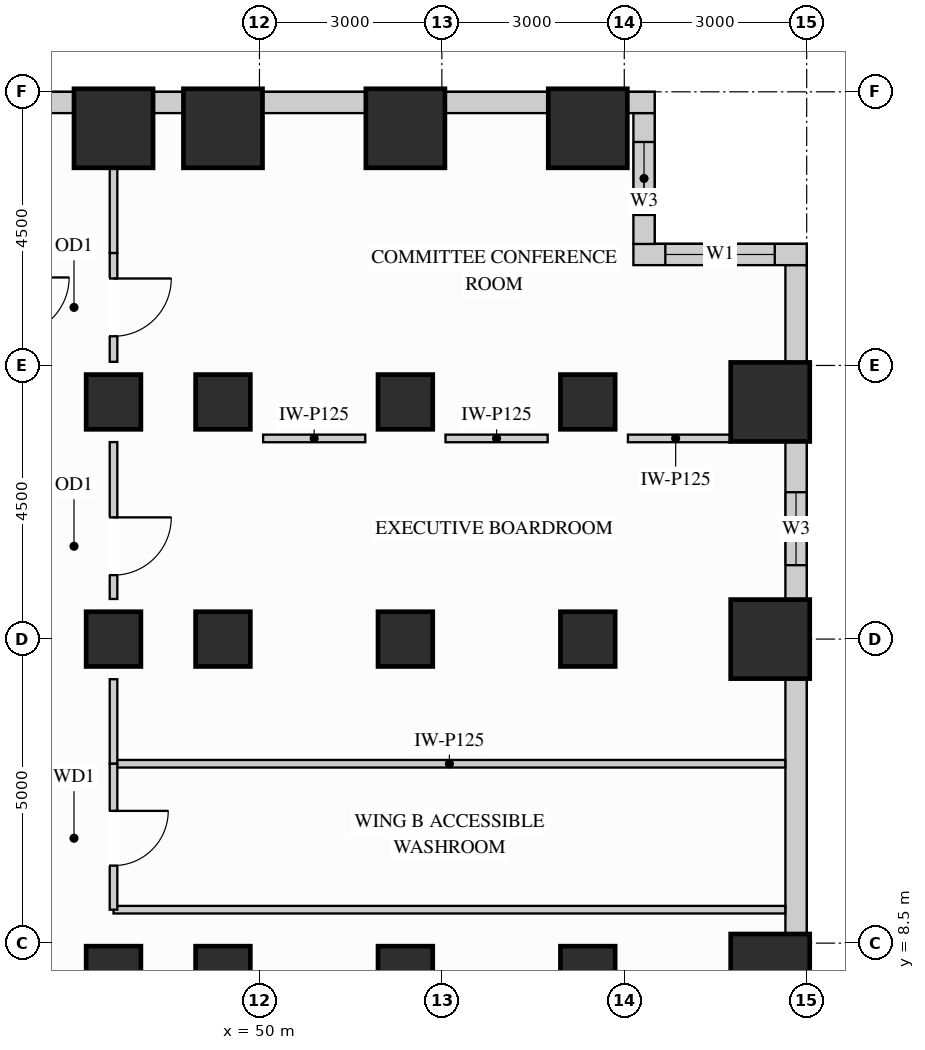
"""IFC4 building model, lengths in metres.
Left out: names, types, materials, properties, quantities, classifications, styles, units other than length and angle.
Written with IfcOpenShell. Run it as: python <this file> out.ifc"""

import sys

from ifc_helpers import new_model, si_unit, direction, frame, frame_2d, origin, origin_2d, place, context, subcontext, project, spatial, rectangle, extrude, source, transform, mapped, element, fill, save


model = new_model("IFC4")
c1 = context("Model", 3, precision=1e-05, world=origin(), true_north=direction((0.0, 1.0)))
c2 = subcontext(c1, "Body", "Model", "MODEL_VIEW")
j1 = project(units=[si_unit("LENGTHUNIT", "METRE"), si_unit("PLANEANGLEUNIT", "RADIAN")], contexts=[c1])
p1 = place(None, origin())
s1 = spatial("IfcSite", under=j1, at=p1, CompositionType="ELEMENT")
p2 = place(p1, origin())
s2 = spatial("IfcBuilding", under=s1, at=p2, CompositionType="ELEMENT")
p3 = place(p2, frame((0.0, 0.0, 51.3)))
s3 = spatial("IfcBuildingStorey", under=s2, at=p3, CompositionType="ELEMENT", Elevation=51.3)
m1 = source(origin(), c2, "Body", "SweptSolid", [
    extrude(rectangle(XDim=0.9, YDim=0.9, at=origin_2d()), origin(), (0.0, 0.0, 1.0), 3.38),
])
for number, where, z_axis, x_axis in (
    (1, (47.6, 13.5, 0.0), (0.0, 0.0, 1.0), (1.0, 0.0, 0.0)),
    (2, (47.6, 8.0, 0.0), (0.0, 0.0, 1.0), (1.0, 0.0, 0.0)),
    (3, (47.6, 17.4, 0.0), (0.0, 0.0, 1.0), (1.0, 0.0, 0.0)),
    (4, (49.4, 13.5, 0.0), (0.0, 0.0, 1.0), (1.0, 0.0, 0.0)),
    (5, (49.4, 17.4, 0.0), (0.0, 0.0, 1.0), (1.0, 0.0, 0.0)),
    (6, (49.4, 8.0, 0.0), (0.0, 0.0, 1.0), (1.0, 0.0, 0.0)),
    (7, (52.4, 13.5, 0.0), (0.0, 0.0, 1.0), (1.0, 0.0, 0.0)),
    (8, (52.4, 17.4, 0.0), (0.0, 0.0, 1.0), (1.0, 0.0, 0.0)),
    (9, (52.4, 8.0, 0.0), (0.0, 0.0, 1.0), (1.0, 0.0, 0.0)),
    (10, (55.4, 13.5, 0.0), (0.0, 0.0, 1.0), (1.0, 0.0, 0.0)),
    (11, (55.4, 17.4, 0.0), (0.0, 0.0, 1.0), (1.0, 0.0, 0.0)),
    (12, (55.4, 8.0, 0.0), (0.0, 0.0, 1.0), (1.0, 0.0, 0.0)),
):
    element("IfcColumn", number, at=place(p3, frame(where, z_axis=z_axis, x_axis=x_axis)), inside=s3, PredefinedType="COLUMN", context=c2, shape_type="MappedRepresentation", body=[
        mapped(m1, transform((0.0, 0.0, 0.0), x_axis=(1.0, 0.0, 0.0), y_axis=(0.0, 1.0, 0.0), z_axis=(0.0, 0.0, 1.0))),
    ])
m2 = source(origin(), c2, "Body", "SweptSolid", [
    extrude(rectangle(XDim=1.3, YDim=1.3, at=origin_2d()), origin(), (0.0, 0.0, 1.0), 3.38),
])
for number, where, z_axis, x_axis in (
    (13, (47.6, 21.9, 0.0), (0.0, 0.0, 1.0), (1.0, 0.0, 0.0)),
    (14, (49.4, 21.9, 0.0), (0.0, 0.0, 1.0), (1.0, 0.0, 0.0)),
    (15, (52.4, 21.9, 0.0), (0.0, 0.0, 1.0), (1.0, 0.0, 0.0)),
    (16, (55.4, 21.9, 0.0), (0.0, 0.0, 1.0), (1.0, 0.0, 0.0)),
    (17, (58.4, 13.5, 0.0), (0.0, 0.0, 1.0), (1.0, 0.0, 0.0)),
    (18, (58.4, 17.4, 0.0), (0.0, 0.0, 1.0), (1.0, 0.0, 0.0)),
    (19, (58.4, 8.0, 0.0), (0.0, 0.0, 1.0), (1.0, 0.0, 0.0)),
):
    element("IfcColumn", number, at=place(p3, frame(where, z_axis=z_axis, x_axis=x_axis)), inside=s3, PredefinedType="COLUMN", context=c2, shape_type="MappedRepresentation", body=[
        mapped(m2, transform((0.0, 0.0, 0.0), x_axis=(1.0, 0.0, 0.0), y_axis=(0.0, 1.0, 0.0), z_axis=(0.0, 0.0, 1.0))),
    ])
m3 = source(origin(), c2, "Body", "SweptSolid", [
    extrude(rectangle(XDim=4.204, YDim=0.35, at=frame_2d((2.102, 0.0))), origin(), (0.0, 0.0, 1.0), 2.51),
])
p4 = place(p3, frame((58.825, 8.648, 0.0), z_axis=(0.0, 0.0, 1.0), x_axis=(0.0, 1.0, 0.0)))
e20 = element("IfcWall", 20, at=p4, inside=s3, PredefinedType="SOLIDWALL", context=c2, shape_type="MappedRepresentation", body=[
    mapped(m3, transform((0.0, 0.0, 0.0), x_axis=(1.0, 0.0, 0.0), y_axis=(0.0, 1.0, 0.0), z_axis=(0.0, 0.0, 1.0))),
])
p5 = place(p3, frame((58.825, 14.148, 0.0), z_axis=(0.0, 0.0, 1.0), x_axis=(0.0, 1.0, 0.0)))
e21 = element("IfcWall", 21, at=p5, inside=s3, PredefinedType="SOLIDWALL", context=c2, shape_type="SweptSolid", body=[
    extrude(rectangle(XDim=2.604, YDim=0.35, at=frame_2d((1.302, 0.0))), origin(), (0.0, 0.0, 1.0), 2.51),
])
p6 = place(p5, frame((0.567, 0.0, 0.78)))
e22 = element("IfcOpeningElement", 22, at=p6, cuts=e21, PredefinedType="OPENING", context=c2, shape_type="SweptSolid", body=[
    extrude(rectangle(XDim=1.2, YDim=1.55, at=frame_2d((0.6, 0.775))), frame((0.0, 0.185, 0.0), z_axis=(0.0, -1.0, 0.0), x_axis=(1.0, 0.0, 0.0)), (0.0, 0.0, 1.0), 0.37),
])
m4 = source(origin(), c2, "Body", "SweptSolid", [
    extrude(rectangle(XDim=1.604, YDim=0.35, at=frame_2d((0.802, 0.0))), origin(), (0.0, 0.0, 1.0), 3.365),
])
p7 = place(p3, frame((58.825, 18.048, 0.0), z_axis=(0.0, 0.0, 1.0), x_axis=(0.0, 1.0, 0.0)))
e23 = element("IfcWall", 23, at=p7, inside=s3, PredefinedType="SOLIDWALL", context=c2, shape_type="MappedRepresentation", body=[
    mapped(m4, transform((0.0, 0.0, 0.0), x_axis=(1.0, 0.0, 0.0), y_axis=(0.0, 1.0, 0.0), z_axis=(0.0, 0.0, 1.0))),
])
p8 = place(p3, frame((59.0, 19.825, 0.0), z_axis=(0.0, 0.0, 1.0), x_axis=(-1.0, 0.0, 0.0)))
e24 = element("IfcWall", 24, at=p8, inside=s3, PredefinedType="SOLIDWALL", context=c2, shape_type="SweptSolid", body=[
    extrude(rectangle(XDim=2.85, YDim=0.35, at=frame_2d((1.425, 0.0))), origin(), (0.0, 0.0, 1.0), 3.365),
])
p9 = place(p8, frame((0.525, 0.0, 0.78)))
e25 = element("IfcOpeningElement", 25, at=p9, cuts=e24, PredefinedType="OPENING", context=c2, shape_type="SweptSolid", body=[
    extrude(rectangle(XDim=1.8, YDim=2.1, at=frame_2d((0.9, 1.05))), frame((0.0, 0.185, 0.0), z_axis=(0.0, -1.0, 0.0), x_axis=(1.0, 0.0, 0.0)), (0.0, 0.0, 1.0), 0.37),
])
p10 = place(p3, frame((56.325, 19.998, 0.0), z_axis=(0.0, 0.0, 1.0), x_axis=(0.0, 1.0, 0.0)))
e26 = element("IfcWall", 26, at=p10, inside=s3, PredefinedType="SOLIDWALL", context=c2, shape_type="SweptSolid", body=[
    extrude(rectangle(XDim=2.154, YDim=0.35, at=frame_2d((1.077, 0.0))), origin(), (0.0, 0.0, 1.0), 3.365),
])
p11 = place(p10, frame((0.477, 0.0, 0.78)))
e27 = element("IfcOpeningElement", 27, at=p11, cuts=e26, PredefinedType="OPENING", context=c2, shape_type="SweptSolid", body=[
    extrude(rectangle(XDim=1.2, YDim=2.1, at=frame_2d((0.6, 1.05))), frame((0.0, 0.185, 0.0), z_axis=(0.0, -1.0, 0.0), x_axis=(1.0, 0.0, 0.0)), (0.0, 0.0, 1.0), 0.37),
])
m5 = source(origin(), c2, "Body", "SweptSolid", [
    extrude(rectangle(XDim=0.452, YDim=0.35, at=frame_2d((0.226, 0.0))), origin(), (0.0, 0.0, 1.0), 3.365),
])
p12 = place(p3, frame((56.5, 22.325, 0.0), z_axis=(0.0, 0.0, 1.0), x_axis=(-1.0, 0.0, 0.0)))
e28 = element("IfcWall", 28, at=p12, inside=s3, PredefinedType="SOLIDWALL", context=c2, shape_type="MappedRepresentation", body=[
    mapped(m5, transform((0.0, 0.0, 0.0), x_axis=(1.0, 0.0, 0.0), y_axis=(0.0, 1.0, 0.0), z_axis=(0.0, 0.0, 1.0))),
])
m6 = source(origin(), c2, "Body", "SweptSolid", [
    extrude(rectangle(XDim=1.704, YDim=0.35, at=frame_2d((0.852, 0.0))), origin(), (0.0, 0.0, 1.0), 2.51),
])
for number, where, z_axis, x_axis in (
    (29, (54.752, 22.325, 0.0), (0.0, 0.0, 1.0), (-1.0, 0.0, 0.0)),
    (30, (51.752, 22.325, 0.0), (0.0, 0.0, 1.0), (-1.0, 0.0, 0.0)),
):
    element("IfcWall", number, at=place(p3, frame(where, z_axis=z_axis, x_axis=x_axis)), inside=s3, PredefinedType="SOLIDWALL", context=c2, shape_type="MappedRepresentation", body=[
        mapped(m6, transform((0.0, 0.0, 0.0), x_axis=(1.0, 0.0, 0.0), y_axis=(0.0, 1.0, 0.0), z_axis=(0.0, 0.0, 1.0))),
    ])
m7 = source(origin(), c2, "Body", "SweptSolid", [
    extrude(rectangle(XDim=0.504, YDim=0.35, at=frame_2d((0.252, 0.0))), origin(), (0.0, 0.0, 1.0), 3.365),
])
p13 = place(p3, frame((48.752, 22.325, 0.0), z_axis=(0.0, 0.0, 1.0), x_axis=(-1.0, 0.0, 0.0)))
e31 = element("IfcWall", 31, at=p13, inside=s3, PredefinedType="SOLIDWALL", context=c2, shape_type="MappedRepresentation", body=[
    mapped(m7, transform((0.0, 0.0, 0.0), x_axis=(1.0, 0.0, 0.0), y_axis=(0.0, 1.0, 0.0), z_axis=(0.0, 0.0, 1.0))),
])
p14 = place(p3, frame((46.952, 22.325, 0.0), z_axis=(0.0, 0.0, 1.0), x_axis=(-1.0, 0.0, 0.0)))
e32 = element("IfcWall", 32, at=p14, inside=s3, PredefinedType="SOLIDWALL", context=c2, shape_type="SweptSolid", body=[
    extrude(rectangle(XDim=6.304, YDim=0.35, at=frame_2d((3.152, 0.0))), origin(), (0.0, 0.0, 1.0), 2.51),
])
p15 = place(p14, frame((1.649, 0.0, 0.78)))
e33 = element("IfcOpeningElement", 33, at=p15, cuts=e32, PredefinedType="OPENING", context=c2, shape_type="SweptSolid", body=[
    extrude(rectangle(XDim=1.8, YDim=1.55, at=frame_2d((0.9, 0.775))), frame((0.0, 0.185, 0.0), z_axis=(0.0, -1.0, 0.0), x_axis=(1.0, 0.0, 0.0)), (0.0, 0.0, 1.0), 0.37),
])
p16 = place(p14, frame((3.817, 0.0, 0.78)))
e34 = element("IfcOpeningElement", 34, at=p16, cuts=e32, PredefinedType="OPENING", context=c2, shape_type="SweptSolid", body=[
    extrude(rectangle(XDim=1.8, YDim=1.55, at=frame_2d((0.9, 0.775))), frame((0.0, 0.185, 0.0), z_axis=(0.0, -1.0, 0.0), x_axis=(1.0, 0.0, 0.0)), (0.0, 0.0, 1.0), 0.37),
])
m8 = source(origin(), c2, "Body", "SweptSolid", [
    extrude(rectangle(XDim=11.048, YDim=0.125, at=frame_2d((5.524, 0.0))), origin(), (0.0, 0.0, 1.0), 3.365),
])
p17 = place(p3, frame((47.6, 11.45, 0.0), z_axis=(0.0, 0.0, 1.0), x_axis=(1.0, 0.0, 0.0)))
e35 = element("IfcWall", 35, at=p17, inside=s3, PredefinedType="PARTITIONING", context=c2, shape_type="MappedRepresentation", body=[
    mapped(m8, transform((0.0, 0.0, 0.0), x_axis=(1.0, 0.0, 0.0), y_axis=(0.0, 1.0, 0.0), z_axis=(0.0, 0.0, 1.0))),
])
m9 = source(origin(), c2, "Body", "SweptSolid", [
    extrude(rectangle(XDim=1.68, YDim=0.125, at=frame_2d((0.84, 0.0))), origin(), (0.0, 0.0, 1.0), 2.67),
])
for number, where, z_axis, x_axis in (
    (36, (50.06, 16.8, 0.0), (0.0, 0.0, 1.0), (1.0, 0.0, 0.0)),
    (37, (53.06, 16.8, 0.0), (0.0, 0.0, 1.0), (1.0, 0.0, 0.0)),
    (38, (56.06, 16.8, 0.0), (0.0, 0.0, 1.0), (1.0, 0.0, 0.0)),
):
    element("IfcWall", number, at=place(p3, frame(where, z_axis=z_axis, x_axis=x_axis)), inside=s3, PredefinedType="PARTITIONING", context=c2, shape_type="MappedRepresentation", body=[
        mapped(m9, transform((0.0, 0.0, 0.0), x_axis=(1.0, 0.0, 0.0), y_axis=(0.0, 1.0, 0.0), z_axis=(0.0, 0.0, 1.0))),
    ])
p18 = place(p3, frame((47.6, 9.05, 0.0), z_axis=(0.0, 0.0, 1.0), x_axis=(1.0, 0.0, 0.0)))
e39 = element("IfcWall", 39, at=p18, inside=s3, PredefinedType="PARTITIONING", context=c2, shape_type="MappedRepresentation", body=[
    mapped(m8, transform((0.0, 0.0, 0.0), x_axis=(1.0, 0.0, 0.0), y_axis=(0.0, 1.0, 0.0), z_axis=(0.0, 0.0, 1.0))),
])
m10 = source(origin(), c2, "Body", "SweptSolid", [
    extrude(rectangle(XDim=1.39, YDim=0.125, at=frame_2d((0.695, 0.0))), origin(), (0.0, 0.0, 1.0), 2.67),
])
p19 = place(p3, frame((47.6, 11.45, 0.0), z_axis=(0.0, 0.0, 1.0), x_axis=(0.0, 1.0, 0.0)))
e40 = element("IfcWall", 40, at=p19, inside=s3, PredefinedType="PARTITIONING", context=c2, shape_type="MappedRepresentation", body=[
    mapped(m10, transform((0.0, 0.0, 0.0), x_axis=(1.0, 0.0, 0.0), y_axis=(0.0, 1.0, 0.0), z_axis=(0.0, 0.0, 1.0))),
])
p20 = place(p3, frame((47.6, 14.16, 0.0), z_axis=(0.0, 0.0, 1.0), x_axis=(0.0, 1.0, 0.0)))
e41 = element("IfcWall", 41, at=p20, inside=s3, PredefinedType="PARTITIONING", context=c2, shape_type="SweptSolid", body=[
    extrude(rectangle(XDim=2.58, YDim=0.125, at=frame_2d((1.29, 0.0))), origin(), (0.0, 0.0, 1.0), 2.67),
])
p21 = place(p20, frame((0.392, 0.0, 0.0)))
e42 = element("IfcOpeningElement", 42, at=p21, cuts=e41, PredefinedType="OPENING", context=c2, shape_type="SweptSolid", body=[
    extrude(rectangle(XDim=0.95, YDim=2.15, at=frame_2d((0.475, 1.075))), frame((0.0, 0.073, 0.0), z_axis=(0.0, -1.0, 0.0), x_axis=(1.0, 0.0, 0.0)), (0.0, 0.0, 1.0), 0.145),
])
p22 = place(p3, frame((47.6, 18.06, 0.0), z_axis=(0.0, 0.0, 1.0), x_axis=(0.0, 1.0, 0.0)))
e43 = element("IfcWall", 43, at=p22, inside=s3, PredefinedType="PARTITIONING", context=c2, shape_type="SweptSolid", body=[
    extrude(rectangle(XDim=1.79, YDim=0.125, at=frame_2d((0.895, 0.0))), origin(), (0.0, 0.0, 1.0), 2.67),
])
p23 = place(p22, frame((0.42, 0.0, 0.0)))
e44 = element("IfcOpeningElement", 44, at=p23, cuts=e43, PredefinedType="OPENING", context=c2, shape_type="SweptSolid", body=[
    extrude(rectangle(XDim=0.95, YDim=2.15, at=frame_2d((0.475, 1.075))), frame((0.0, 0.073, 0.0), z_axis=(0.0, -1.0, 0.0), x_axis=(1.0, 0.0, 0.0)), (0.0, 0.0, 1.0), 0.145),
])
m11 = source(origin(), c2, "Body", "SweptSolid", [
    extrude(rectangle(XDim=1.39, YDim=0.125, at=frame_2d((0.695, 0.0))), origin(), (0.0, 0.0, 1.0), 2.67),
])
p24 = place(p3, frame((47.6, 19.85, 0.0), z_axis=(0.0, 0.0, 1.0), x_axis=(0.0, 1.0, 0.0)))
e45 = element("IfcWall", 45, at=p24, inside=s3, PredefinedType="PARTITIONING", context=c2, shape_type="MappedRepresentation", body=[
    mapped(m11, transform((0.0, 0.0, 0.0), x_axis=(1.0, 0.0, 0.0), y_axis=(0.0, 1.0, 0.0), z_axis=(0.0, 0.0, 1.0))),
])
p25 = place(p3, frame((47.6, 9.05, 0.0), z_axis=(0.0, 0.0, 1.0), x_axis=(0.0, 1.0, 0.0)))
e46 = element("IfcWall", 46, at=p25, inside=s3, PredefinedType="PARTITIONING", context=c2, shape_type="SweptSolid", body=[
    extrude(rectangle(XDim=2.4, YDim=0.125, at=frame_2d((1.2, 0.0))), origin(), (0.0, 0.0, 1.0), 2.67),
])
p26 = place(p25, frame((0.725, 0.0, 0.0)))
e47 = element("IfcOpeningElement", 47, at=p26, cuts=e46, PredefinedType="OPENING", context=c2, shape_type="SweptSolid", body=[
    extrude(rectangle(XDim=0.9, YDim=2.15, at=frame_2d((0.45, 1.075))), frame((0.0, 0.073, 0.0), z_axis=(0.0, -1.0, 0.0), x_axis=(1.0, 0.0, 0.0)), (0.0, 0.0, 1.0), 0.145),
])
m12 = source(origin(), c2, "Body", "SweptSolid", [
    extrude(rectangle(XDim=0.95, YDim=2.15, at=frame_2d((0.475, 1.075))), frame((0.0, 0.025, 0.0), z_axis=(0.0, -1.0, 0.0), x_axis=(1.0, 0.0, 0.0)), (0.0, 0.0, 1.0), 0.05),
])
p27 = place(p21, origin())
e48 = element("IfcDoor", 48, at=p27, inside=s3, OperationType="SINGLE_SWING_RIGHT", PredefinedType="DOOR", context=c2, shape_type="MappedRepresentation", body=[
    mapped(m12, transform((0.0, 0.0, 0.0), x_axis=(1.0, 0.0, 0.0), y_axis=(0.0, 1.0, 0.0), z_axis=(0.0, 0.0, 1.0))),
])
fill(e42, e48)
p28 = place(p23, origin())
e49 = element("IfcDoor", 49, at=p28, inside=s3, OperationType="SINGLE_SWING_RIGHT", PredefinedType="DOOR", context=c2, shape_type="MappedRepresentation", body=[
    mapped(m12, transform((0.0, 0.0, 0.0), x_axis=(1.0, 0.0, 0.0), y_axis=(0.0, 1.0, 0.0), z_axis=(0.0, 0.0, 1.0))),
])
fill(e44, e49)
m13 = source(origin(), c2, "Body", "SweptSolid", [
    extrude(rectangle(XDim=0.9, YDim=2.15, at=frame_2d((0.45, 1.075))), frame((0.0, 0.025, 0.0), z_axis=(0.0, -1.0, 0.0), x_axis=(1.0, 0.0, 0.0)), (0.0, 0.0, 1.0), 0.05),
])
p29 = place(p26, origin())
e50 = element("IfcDoor", 50, at=p29, inside=s3, OperationType="SINGLE_SWING_RIGHT", PredefinedType="DOOR", context=c2, shape_type="MappedRepresentation", body=[
    mapped(m13, transform((0.0, 0.0, 0.0), x_axis=(1.0, 0.0, 0.0), y_axis=(0.0, 1.0, 0.0), z_axis=(0.0, 0.0, 1.0))),
])
fill(e47, e50)
m14 = source(origin(), c2, "Body", "SweptSolid", [
    extrude(rectangle(XDim=1.8, YDim=2.1, at=frame_2d((0.9, 1.05))), frame((0.0, 0.03, 0.0), z_axis=(0.0, -1.0, 0.0), x_axis=(1.0, 0.0, 0.0)), (0.0, 0.0, 1.0), 0.06),
])
p30 = place(p9, origin())
e51 = element("IfcWindow", 51, at=p30, inside=s3, PartitioningType="SINGLE_PANEL", PredefinedType="WINDOW", context=c2, shape_type="MappedRepresentation", body=[
    mapped(m14, transform((0.0, 0.0, 0.0), x_axis=(1.0, 0.0, 0.0), y_axis=(0.0, 1.0, 0.0), z_axis=(0.0, 0.0, 1.0))),
])
fill(e25, e51)
m15 = source(origin(), c2, "Body", "SweptSolid", [
    extrude(rectangle(XDim=1.2, YDim=1.55, at=frame_2d((0.6, 0.775))), frame((0.0, 0.03, 0.0), z_axis=(0.0, -1.0, 0.0), x_axis=(1.0, 0.0, 0.0)), (0.0, 0.0, 1.0), 0.06),
])
p31 = place(p6, origin())
e52 = element("IfcWindow", 52, at=p31, inside=s3, PartitioningType="SINGLE_PANEL", PredefinedType="WINDOW", context=c2, shape_type="MappedRepresentation", body=[
    mapped(m15, transform((0.0, 0.0, 0.0), x_axis=(1.0, 0.0, 0.0), y_axis=(0.0, 1.0, 0.0), z_axis=(0.0, 0.0, 1.0))),
])
fill(e22, e52)
m16 = source(origin(), c2, "Body", "SweptSolid", [
    extrude(rectangle(XDim=1.2, YDim=2.1, at=frame_2d((0.6, 1.05))), frame((0.0, 0.03, 0.0), z_axis=(0.0, -1.0, 0.0), x_axis=(1.0, 0.0, 0.0)), (0.0, 0.0, 1.0), 0.06),
])
p32 = place(p11, origin())
e53 = element("IfcWindow", 53, at=p32, inside=s3, PartitioningType="SINGLE_PANEL", PredefinedType="WINDOW", context=c2, shape_type="MappedRepresentation", body=[
    mapped(m16, transform((0.0, 0.0, 0.0), x_axis=(1.0, 0.0, 0.0), y_axis=(0.0, 1.0, 0.0), z_axis=(0.0, 0.0, 1.0))),
])
fill(e27, e53)
save(model, sys.argv[1])
